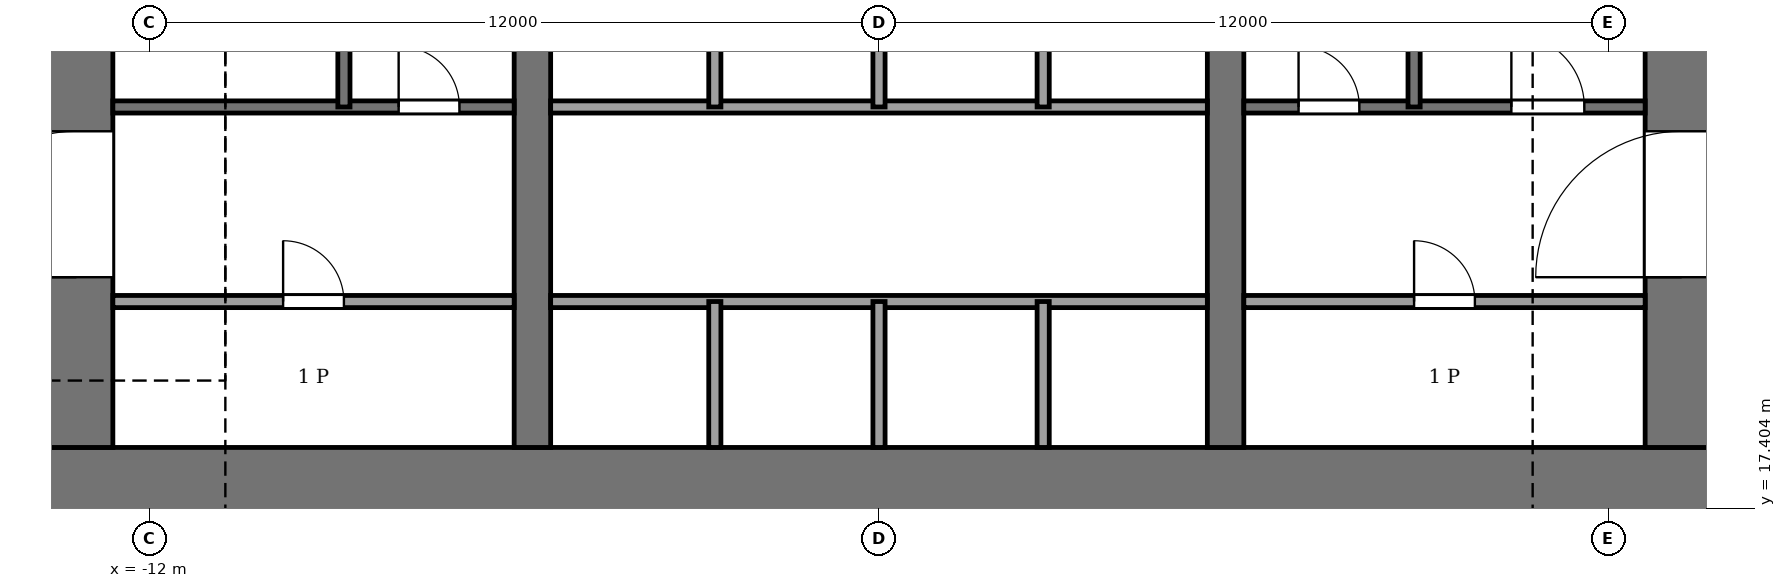
"""IFC4 building model, lengths in metres.
Left out: names, types, materials, properties, quantities, classifications, styles, units other than length and angle.
Written with IfcOpenShell. Run it as: python <this file> out.ifc"""

import sys

from ifc_helpers import new_model, si_unit, direction, frame, frame_2d, origin, place, context, subcontext, project, spatial, rectangle, extrude, element, fill, save


model = new_model("IFC4")
c1 = context("Model", 3, precision=1e-05, world=origin(), true_north=direction((0.0, 1.0)))
c2 = subcontext(c1, "Body", "Model", "MODEL_VIEW")
j1 = project(units=[si_unit("LENGTHUNIT", "METRE"), si_unit("PLANEANGLEUNIT", "RADIAN")], contexts=[c1])
p1 = place(None, origin())
s1 = spatial("IfcSite", under=j1, at=p1, CompositionType="ELEMENT")
p2 = place(p1, origin())
s2 = spatial("IfcBuilding", under=s1, at=p2, CompositionType="ELEMENT")
p3 = place(p2, frame((0.0, 0.0, 114.0)))
s3 = spatial("IfcBuildingStorey", under=s2, at=p3, CompositionType="ELEMENT", Elevation=114.0)
p4 = place(p3, frame((-13.8, 17.8, -0.25), z_axis=(0.0, 0.0, 1.0), x_axis=(1.0, 0.0, 0.0)))
e1 = element("IfcWall", 1, at=p4, inside=s3, PredefinedType="SHEAR", context=c2, shape_type="SweptSolid", body=[
    extrude(rectangle(XDim=27.6, YDim=1.2, at=frame_2d((13.8, 0.0))), origin(), (0.0, 0.0, 1.0), 7.12),
])
p5 = place(p3, frame((-13.2, 18.4, -0.25), z_axis=(0.0, 0.0, 1.0), x_axis=(0.0, 1.0, 0.0)))
e2 = element("IfcWall", 2, at=p5, inside=s3, PredefinedType="SHEAR", context=c2, shape_type="SweptSolid", body=[
    extrude(rectangle(XDim=19.2, YDim=1.2, at=frame_2d((9.6, 0.0))), origin(), (0.0, 0.0, 1.0), 7.12),
])
p6 = place(p5, frame((2.8, 0.0, 0.25)))
e3 = element("IfcOpeningElement", 3, at=p6, cuts=e2, PredefinedType="OPENING", context=c2, shape_type="SweptSolid", body=[
    extrude(rectangle(XDim=2.4, YDim=2.4, at=frame_2d((1.2, 1.2))), frame((0.0, 0.61, 0.0), z_axis=(0.0, -1.0, 0.0), x_axis=(1.0, 0.0, 0.0)), (0.0, 0.0, 1.0), 1.22),
])
p7 = place(p5, frame((13.4, 0.0, 0.25)))
e4 = element("IfcOpeningElement", 4, at=p7, cuts=e2, PredefinedType="OPENING", context=c2, shape_type="SweptSolid", body=[
    extrude(rectangle(XDim=1.4, YDim=2.2, at=frame_2d((0.7, 1.1))), frame((0.0, 0.61, 0.0), z_axis=(0.0, -1.0, 0.0), x_axis=(1.0, 0.0, 0.0)), (0.0, 0.0, 1.0), 1.22),
])
p8 = place(p3, frame((13.2, 18.4, -0.25), z_axis=(0.0, 0.0, 1.0), x_axis=(0.0, 1.0, 0.0)))
e5 = element("IfcWall", 5, at=p8, inside=s3, PredefinedType="SHEAR", context=c2, shape_type="SweptSolid", body=[
    extrude(rectangle(XDim=19.2, YDim=1.2, at=frame_2d((9.6, 0.0))), origin(), (0.0, 0.0, 1.0), 7.12),
])
p9 = place(p8, frame((2.8, 0.0, 0.25)))
e6 = element("IfcOpeningElement", 6, at=p9, cuts=e5, PredefinedType="OPENING", context=c2, shape_type="SweptSolid", body=[
    extrude(rectangle(XDim=2.4, YDim=2.4, at=frame_2d((1.2, 1.2))), frame((0.0, 0.61, 0.0), z_axis=(0.0, -1.0, 0.0), x_axis=(1.0, 0.0, 0.0)), (0.0, 0.0, 1.0), 1.22),
])
p10 = place(p8, frame((13.3, 0.0, 0.25)))
e7 = element("IfcOpeningElement", 7, at=p10, cuts=e5, PredefinedType="OPENING", context=c2, shape_type="SweptSolid", body=[
    extrude(rectangle(XDim=2.4, YDim=2.4, at=frame_2d((1.2, 1.2))), frame((0.0, 0.61, 0.0), z_axis=(0.0, -1.0, 0.0), x_axis=(1.0, 0.0, 0.0)), (0.0, 0.0, 1.0), 1.22),
])
p11 = place(p3, frame((-5.7, 18.4, -0.25), z_axis=(0.0, 0.0, 1.0), x_axis=(0.0, 1.0, 0.0)))
e8 = element("IfcWall", 8, at=p11, inside=s3, PredefinedType="SHEAR", context=c2, shape_type="SweptSolid", body=[
    extrude(rectangle(XDim=19.2, YDim=0.6, at=frame_2d((9.6, 0.0))), origin(), (0.0, 0.0, 1.0), 7.12),
])
p12 = place(p11, frame((8.35, 0.0, 0.25)))
e9 = element("IfcOpeningElement", 9, at=p12, cuts=e8, PredefinedType="OPENING", context=c2, shape_type="SweptSolid", body=[
    extrude(rectangle(XDim=0.9, YDim=2.1, at=frame_2d((0.45, 1.05))), frame((0.0, 0.31, 0.0), z_axis=(0.0, -1.0, 0.0), x_axis=(1.0, 0.0, 0.0)), (0.0, 0.0, 1.0), 0.62),
])
p13 = place(p3, frame((5.7, 18.4, -0.25), z_axis=(0.0, 0.0, 1.0), x_axis=(0.0, 1.0, 0.0)))
e10 = element("IfcWall", 10, at=p13, inside=s3, PredefinedType="SHEAR", context=c2, shape_type="SweptSolid", body=[
    extrude(rectangle(XDim=19.2, YDim=0.6, at=frame_2d((9.6, 0.0))), origin(), (0.0, 0.0, 1.0), 7.12),
])
p14 = place(p13, frame((13.3, 0.0, 0.25)))
e11 = element("IfcOpeningElement", 11, at=p14, cuts=e10, PredefinedType="OPENING", context=c2, shape_type="SweptSolid", body=[
    extrude(rectangle(XDim=2.4, YDim=2.4, at=frame_2d((1.2, 1.2))), frame((0.0, 0.31, 0.0), z_axis=(0.0, -1.0, 0.0), x_axis=(1.0, 0.0, 0.0)), (0.0, 0.0, 1.0), 0.62),
])
p15 = place(p3, frame((-12.6, 20.8, 0.0), z_axis=(0.0, 0.0, 1.0), x_axis=(1.0, 0.0, 0.0)))
e12 = element("IfcWall", 12, at=p15, inside=s3, PredefinedType="PARTITIONING", context=c2, shape_type="SweptSolid", body=[
    extrude(rectangle(XDim=6.6, YDim=0.2, at=frame_2d((3.3, 0.0))), origin(), (0.0, 0.0, 1.0), 6.87),
])
p16 = place(p15, frame((2.8, 0.0, 0.0)))
e13 = element("IfcOpeningElement", 13, at=p16, cuts=e12, PredefinedType="OPENING", context=c2, shape_type="SweptSolid", body=[
    extrude(rectangle(XDim=1.0, YDim=2.1, at=frame_2d((0.5, 1.05))), frame((0.0, 0.11, 0.0), z_axis=(0.0, -1.0, 0.0), x_axis=(1.0, 0.0, 0.0)), (0.0, 0.0, 1.0), 0.22),
])
p17 = place(p3, frame((-5.4, 20.8, 0.0), z_axis=(0.0, 0.0, 1.0), x_axis=(1.0, 0.0, 0.0)))
e14 = element("IfcWall", 14, at=p17, inside=s3, PredefinedType="PARTITIONING", context=c2, shape_type="SweptSolid", body=[
    extrude(rectangle(XDim=10.8, YDim=0.2, at=frame_2d((5.4, 0.0))), origin(), (0.0, 0.0, 1.0), 6.87),
])
p18 = place(p3, frame((6.0, 20.8, 0.0), z_axis=(0.0, 0.0, 1.0), x_axis=(1.0, 0.0, 0.0)))
e15 = element("IfcWall", 15, at=p18, inside=s3, PredefinedType="PARTITIONING", context=c2, shape_type="SweptSolid", body=[
    extrude(rectangle(XDim=6.6, YDim=0.2, at=frame_2d((3.3, 0.0))), origin(), (0.0, 0.0, 1.0), 6.87),
])
p19 = place(p18, frame((2.8, 0.0, 0.0)))
e16 = element("IfcOpeningElement", 16, at=p19, cuts=e15, PredefinedType="OPENING", context=c2, shape_type="SweptSolid", body=[
    extrude(rectangle(XDim=1.0, YDim=2.1, at=frame_2d((0.5, 1.05))), frame((0.0, 0.11, 0.0), z_axis=(0.0, -1.0, 0.0), x_axis=(1.0, 0.0, 0.0)), (0.0, 0.0, 1.0), 0.22),
])
p20 = place(p3, frame((-12.6, 24.0, 0.0), z_axis=(0.0, 0.0, 1.0), x_axis=(1.0, 0.0, 0.0)))
e17 = element("IfcWall", 17, at=p20, inside=s3, PredefinedType="PARTITIONING", context=c2, shape_type="SweptSolid", body=[
    extrude(rectangle(XDim=6.6, YDim=0.2, at=frame_2d((3.3, 0.0))), origin(), (0.0, 0.0, 1.0), 6.87),
])
p21 = place(p20, frame((4.7, 0.0, 0.0)))
e18 = element("IfcOpeningElement", 18, at=p21, cuts=e17, PredefinedType="OPENING", context=c2, shape_type="SweptSolid", body=[
    extrude(rectangle(XDim=1.0, YDim=2.1, at=frame_2d((0.5, 1.05))), frame((0.0, 0.11, 0.0), z_axis=(0.0, -1.0, 0.0), x_axis=(1.0, 0.0, 0.0)), (0.0, 0.0, 1.0), 0.22),
])
p22 = place(p3, frame((-5.4, 24.0, 0.0), z_axis=(0.0, 0.0, 1.0), x_axis=(1.0, 0.0, 0.0)))
e19 = element("IfcWall", 19, at=p22, inside=s3, PredefinedType="PARTITIONING", context=c2, shape_type="SweptSolid", body=[
    extrude(rectangle(XDim=10.8, YDim=0.2, at=frame_2d((5.4, 0.0))), origin(), (0.0, 0.0, 1.0), 6.87),
])
p23 = place(p3, frame((6.0, 24.0, 0.0), z_axis=(0.0, 0.0, 1.0), x_axis=(1.0, 0.0, 0.0)))
e20 = element("IfcWall", 20, at=p23, inside=s3, PredefinedType="PARTITIONING", context=c2, shape_type="SweptSolid", body=[
    extrude(rectangle(XDim=6.6, YDim=0.2, at=frame_2d((3.3, 0.0))), origin(), (0.0, 0.0, 1.0), 6.87),
])
p24 = place(p23, frame((0.9, 0.0, 0.0)))
e21 = element("IfcOpeningElement", 21, at=p24, cuts=e20, PredefinedType="OPENING", context=c2, shape_type="SweptSolid", body=[
    extrude(rectangle(XDim=1.0, YDim=2.1, at=frame_2d((0.5, 1.05))), frame((0.0, 0.11, 0.0), z_axis=(0.0, -1.0, 0.0), x_axis=(1.0, 0.0, 0.0)), (0.0, 0.0, 1.0), 0.22),
])
p25 = place(p23, frame((4.4, 0.0, 0.0)))
e22 = element("IfcOpeningElement", 22, at=p25, cuts=e20, PredefinedType="OPENING", context=c2, shape_type="SweptSolid", body=[
    extrude(rectangle(XDim=1.2, YDim=2.2, at=frame_2d((0.6, 1.1))), frame((0.0, 0.11, 0.0), z_axis=(0.0, -1.0, 0.0), x_axis=(1.0, 0.0, 0.0)), (0.0, 0.0, 1.0), 0.22),
])
p26 = place(p3, frame((-8.8, 24.0, 0.0), z_axis=(0.0, 0.0, 1.0), x_axis=(0.0, 1.0, 0.0)))
e23 = element("IfcWall", 23, at=p26, inside=s3, PredefinedType="PARTITIONING", context=c2, shape_type="SweptSolid", body=[
    extrude(rectangle(XDim=7.4, YDim=0.2, at=frame_2d((3.7, 0.0))), origin(), (0.0, 0.0, 1.0), 6.87),
])
p27 = place(p3, frame((-2.7, 18.4, 0.0), z_axis=(0.0, 0.0, 1.0), x_axis=(0.0, 1.0, 0.0)))
e24 = element("IfcWall", 24, at=p27, inside=s3, PredefinedType="PARTITIONING", context=c2, shape_type="SweptSolid", body=[
    extrude(rectangle(XDim=2.4, YDim=0.2, at=frame_2d((1.2, 0.0))), origin(), (0.0, 0.0, 1.0), 6.87),
])
p28 = place(p3, frame((-2.7, 24.0, 0.0), z_axis=(0.0, 0.0, 1.0), x_axis=(0.0, 1.0, 0.0)))
e25 = element("IfcWall", 25, at=p28, inside=s3, PredefinedType="PARTITIONING", context=c2, shape_type="SweptSolid", body=[
    extrude(rectangle(XDim=2.4, YDim=0.2, at=frame_2d((1.2, 0.0))), origin(), (0.0, 0.0, 1.0), 6.87),
])
p29 = place(p3, frame((0.0, 18.4, 0.0), z_axis=(0.0, 0.0, 1.0), x_axis=(0.0, 1.0, 0.0)))
e26 = element("IfcWall", 26, at=p29, inside=s3, PredefinedType="PARTITIONING", context=c2, shape_type="SweptSolid", body=[
    extrude(rectangle(XDim=2.4, YDim=0.2, at=frame_2d((1.2, 0.0))), origin(), (0.0, 0.0, 1.0), 6.87),
])
p30 = place(p3, frame((0.0, 24.0, 0.0), z_axis=(0.0, 0.0, 1.0), x_axis=(0.0, 1.0, 0.0)))
e27 = element("IfcWall", 27, at=p30, inside=s3, PredefinedType="PARTITIONING", context=c2, shape_type="SweptSolid", body=[
    extrude(rectangle(XDim=2.4, YDim=0.2, at=frame_2d((1.2, 0.0))), origin(), (0.0, 0.0, 1.0), 6.87),
])
p31 = place(p3, frame((2.7, 18.4, 0.0), z_axis=(0.0, 0.0, 1.0), x_axis=(0.0, 1.0, 0.0)))
e28 = element("IfcWall", 28, at=p31, inside=s3, PredefinedType="PARTITIONING", context=c2, shape_type="SweptSolid", body=[
    extrude(rectangle(XDim=2.4, YDim=0.2, at=frame_2d((1.2, 0.0))), origin(), (0.0, 0.0, 1.0), 6.87),
])
p32 = place(p3, frame((2.7, 24.0, 0.0), z_axis=(0.0, 0.0, 1.0), x_axis=(0.0, 1.0, 0.0)))
e29 = element("IfcWall", 29, at=p32, inside=s3, PredefinedType="PARTITIONING", context=c2, shape_type="SweptSolid", body=[
    extrude(rectangle(XDim=2.4, YDim=0.2, at=frame_2d((1.2, 0.0))), origin(), (0.0, 0.0, 1.0), 6.87),
])
p33 = place(p3, frame((8.8, 24.0, 0.0), z_axis=(0.0, 0.0, 1.0), x_axis=(0.0, 1.0, 0.0)))
e30 = element("IfcWall", 30, at=p33, inside=s3, PredefinedType="PARTITIONING", context=c2, shape_type="SweptSolid", body=[
    extrude(rectangle(XDim=7.4, YDim=0.2, at=frame_2d((3.7, 0.0))), origin(), (0.0, 0.0, 1.0), 6.87),
])
p34 = place(p16, origin())
e31 = element("IfcDoor", 31, at=p34, inside=s3, OperationType="SINGLE_SWING_LEFT", PredefinedType="DOOR", context=c2, shape_type="SweptSolid", body=[
    extrude(rectangle(XDim=1.0, YDim=2.1, at=frame_2d((0.5, 1.05))), frame((0.0, 0.025, 0.0), z_axis=(0.0, -1.0, 0.0), x_axis=(1.0, 0.0, 0.0)), (0.0, 0.0, 1.0), 0.05),
])
fill(e13, e31)
p35 = place(p19, origin())
e32 = element("IfcDoor", 32, at=p35, inside=s3, OperationType="SINGLE_SWING_RIGHT", PredefinedType="DOOR", context=c2, shape_type="SweptSolid", body=[
    extrude(rectangle(XDim=1.0, YDim=2.1, at=frame_2d((0.5, 1.05))), frame((0.0, 0.025, 0.0), z_axis=(0.0, -1.0, 0.0), x_axis=(1.0, 0.0, 0.0)), (0.0, 0.0, 1.0), 0.05),
])
fill(e16, e32)
p36 = place(p21, origin())
e33 = element("IfcDoor", 33, at=p36, inside=s3, OperationType="SINGLE_SWING_RIGHT", PredefinedType="DOOR", context=c2, shape_type="SweptSolid", body=[
    extrude(rectangle(XDim=1.0, YDim=2.1, at=frame_2d((0.5, 1.05))), frame((0.0, 0.025, 0.0), z_axis=(0.0, -1.0, 0.0), x_axis=(1.0, 0.0, 0.0)), (0.0, 0.0, 1.0), 0.05),
])
fill(e18, e33)
p37 = place(p24, origin())
e34 = element("IfcDoor", 34, at=p37, inside=s3, OperationType="SINGLE_SWING_LEFT", PredefinedType="DOOR", context=c2, shape_type="SweptSolid", body=[
    extrude(rectangle(XDim=1.0, YDim=2.1, at=frame_2d((0.5, 1.05))), frame((0.0, 0.025, 0.0), z_axis=(0.0, -1.0, 0.0), x_axis=(1.0, 0.0, 0.0)), (0.0, 0.0, 1.0), 0.05),
])
fill(e21, e34)
p38 = place(p25, origin())
e35 = element("IfcDoor", 35, at=p38, inside=s3, OperationType="SINGLE_SWING_LEFT", PredefinedType="DOOR", context=c2, shape_type="SweptSolid", body=[
    extrude(rectangle(XDim=1.2, YDim=2.2, at=frame_2d((0.6, 1.1))), frame((0.0, 0.025, 0.0), z_axis=(0.0, -1.0, 0.0), x_axis=(1.0, 0.0, 0.0)), (0.0, 0.0, 1.0), 0.05),
])
fill(e22, e35)
p39 = place(p6, origin())
e36 = element("IfcDoor", 36, at=p39, inside=s3, OperationType="DOUBLE_DOOR_SINGLE_SWING", PredefinedType="DOOR", context=c2, shape_type="SweptSolid", body=[
    extrude(rectangle(XDim=2.4, YDim=2.4, at=frame_2d((1.2, 1.2))), frame((0.0, 0.025, 0.0), z_axis=(0.0, -1.0, 0.0), x_axis=(1.0, 0.0, 0.0)), (0.0, 0.0, 1.0), 0.05),
])
fill(e3, e36)
p40 = place(p9, origin())
e37 = element("IfcDoor", 37, at=p40, inside=s3, OperationType="DOUBLE_DOOR_SINGLE_SWING", PredefinedType="DOOR", context=c2, shape_type="SweptSolid", body=[
    extrude(rectangle(XDim=2.4, YDim=2.4, at=frame_2d((1.2, 1.2))), frame((0.0, 0.025, 0.0), z_axis=(0.0, -1.0, 0.0), x_axis=(1.0, 0.0, 0.0)), (0.0, 0.0, 1.0), 0.05),
])
fill(e6, e37)
save(model, sys.argv[1])
